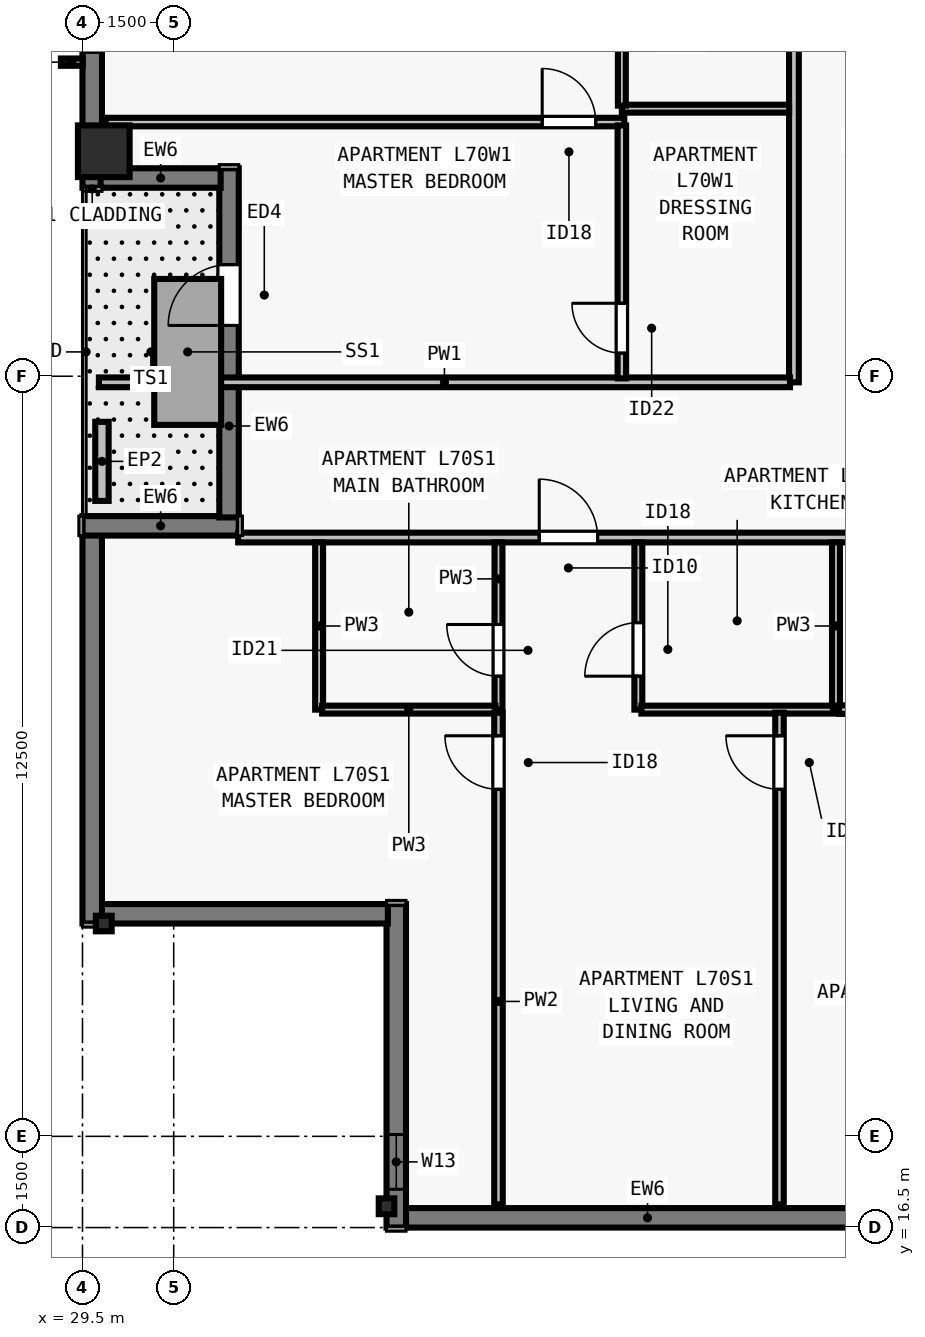
"""IFC4 building model, lengths in metres.
Left out: names, types, materials, properties, quantities, classifications, styles, units other than length and angle.
Written with IfcOpenShell. Run it as: python <this file> out.ifc"""

import sys

from ifc_helpers import new_model, si_unit, direction, frame, frame_2d, origin, origin_2d, place, context, subcontext, project, spatial, rectangle, i_section, extrude, element, fill, save


model = new_model("IFC4")
c1 = context("Model", 3, precision=1e-05, world=origin(), true_north=direction((0.0, 1.0)))
c2 = subcontext(c1, "Body", "Model", "MODEL_VIEW")
j1 = project(units=[si_unit("LENGTHUNIT", "METRE"), si_unit("PLANEANGLEUNIT", "RADIAN")], contexts=[c1])
p1 = place(None, origin())
s1 = spatial("IfcSite", under=j1, at=p1, CompositionType="ELEMENT")
p2 = place(p1, origin())
s2 = spatial("IfcBuilding", under=s1, at=p2, CompositionType="ELEMENT")
p3 = place(p2, frame((0.0, 0.0, 255.0)))
s3 = spatial("IfcBuildingStorey", under=s2, at=p3, CompositionType="ELEMENT", Elevation=255.0)
p4 = place(p3, frame((34.5, 16.85, 0.0), z_axis=(0.0, 0.0, 1.0), x_axis=(1.0, 0.0, 0.0)))
e1 = element("IfcColumn", 1, at=p4, inside=s3, PredefinedType="COLUMN", context=c2, shape_type="SweptSolid", body=[
    extrude(i_section(OverallWidth=0.256, OverallDepth=0.26, WebThickness=0.01, FlangeThickness=0.017, FilletRadius=0.013, at=origin_2d()), origin(), (0.0, 0.0, 1.0), 3.5),
])
p5 = place(p3, frame((29.85, 34.2, 0.0), z_axis=(0.0, 0.0, 1.0), x_axis=(0.0, 1.0, 0.0)))
e2 = element("IfcColumn", 2, at=p5, inside=s3, PredefinedType="COLUMN", context=c2, shape_type="SweptSolid", body=[
    extrude(rectangle(XDim=0.85, YDim=0.85, at=origin_2d()), origin(), (0.0, 0.0, 1.0), 3.5),
])
p6 = place(p3, frame((29.85, 21.5, 0.0), z_axis=(0.0, 0.0, 1.0), x_axis=(0.0, 1.0, 0.0)))
e3 = element("IfcColumn", 3, at=p6, inside=s3, PredefinedType="COLUMN", context=c2, shape_type="SweptSolid", body=[
    extrude(i_section(OverallWidth=0.256, OverallDepth=0.26, WebThickness=0.01, FlangeThickness=0.017, FilletRadius=0.013, at=origin_2d()), origin(), (0.0, 0.0, 1.0), 3.5),
])
p7 = place(p3, frame((29.66, 33.6, 0.0), z_axis=(0.0, 0.0, 1.0), x_axis=(0.0, 1.0, 0.0)))
e4 = element("IfcWall", 4, at=p7, inside=s3, PredefinedType="SOLIDWALL", context=c2, shape_type="SweptSolid", body=[
    extrude(rectangle(XDim=22.602, YDim=0.32, at=frame_2d((11.301, 0.0))), origin(), (0.0, 0.0, 1.0), 3.29),
])
p8 = place(p7, frame((2.225, 0.0, 0.8)))
e5 = element("IfcOpeningElement", 5, at=p8, cuts=e4, PredefinedType="OPENING", context=c2, shape_type="SweptSolid", body=[
    extrude(rectangle(XDim=1.55, YDim=1.678, at=frame_2d((0.775, 0.839))), frame((0.0, 0.17, 0.0), z_axis=(0.0, -1.0, 0.0), x_axis=(1.0, 0.0, 0.0)), (0.0, 0.0, 1.0), 0.34),
])
p9 = place(p7, frame((4.726, 0.0, 0.8)))
e6 = element("IfcOpeningElement", 6, at=p9, cuts=e4, PredefinedType="OPENING", context=c2, shape_type="SweptSolid", body=[
    extrude(rectangle(XDim=1.85, YDim=1.678, at=frame_2d((0.925, 0.839))), frame((0.0, 0.17, 0.0), z_axis=(0.0, -1.0, 0.0), x_axis=(1.0, 0.0, 0.0)), (0.0, 0.0, 1.0), 0.34),
])
p10 = place(p7, frame((11.726, 0.0, 0.8)))
e7 = element("IfcOpeningElement", 7, at=p10, cuts=e4, PredefinedType="OPENING", context=c2, shape_type="SweptSolid", body=[
    extrude(rectangle(XDim=1.85, YDim=1.678, at=frame_2d((0.925, 0.839))), frame((0.0, 0.17, 0.0), z_axis=(0.0, -1.0, 0.0), x_axis=(1.0, 0.0, 0.0)), (0.0, 0.0, 1.0), 0.34),
])
p11 = place(p3, frame((69.5, 16.66, 0.0), z_axis=(0.0, 0.0, 1.0), x_axis=(-1.0, 0.0, 0.0)))
e8 = element("IfcWall", 8, at=p11, inside=s3, PredefinedType="SOLIDWALL", context=c2, shape_type="SweptSolid", body=[
    extrude(rectangle(XDim=34.702, YDim=0.32, at=frame_2d((17.351, 0.0))), origin(), (0.0, 0.0, 1.0), 3.29),
])
p12 = place(p11, frame((4.312, 0.0, 0.8)))
e9 = element("IfcOpeningElement", 9, at=p12, cuts=e8, PredefinedType="OPENING", context=c2, shape_type="SweptSolid", body=[
    extrude(rectangle(XDim=1.55, YDim=1.678, at=frame_2d((0.775, 0.839))), frame((0.0, 0.17, 0.0), z_axis=(0.0, -1.0, 0.0), x_axis=(1.0, 0.0, 0.0)), (0.0, 0.0, 1.0), 0.34),
])
p13 = place(p11, frame((7.988, 0.0, 0.8)))
e10 = element("IfcOpeningElement", 10, at=p13, cuts=e8, PredefinedType="OPENING", context=c2, shape_type="SweptSolid", body=[
    extrude(rectangle(XDim=1.85, YDim=1.678, at=frame_2d((0.925, 0.839))), frame((0.0, 0.17, 0.0), z_axis=(0.0, -1.0, 0.0), x_axis=(1.0, 0.0, 0.0)), (0.0, 0.0, 1.0), 0.34),
])
p14 = place(p11, frame((15.188, 0.0, 0.8)))
e11 = element("IfcOpeningElement", 11, at=p14, cuts=e8, PredefinedType="OPENING", context=c2, shape_type="SweptSolid", body=[
    extrude(rectangle(XDim=1.85, YDim=1.678, at=frame_2d((0.925, 0.839))), frame((0.0, 0.17, 0.0), z_axis=(0.0, -1.0, 0.0), x_axis=(1.0, 0.0, 0.0)), (0.0, 0.0, 1.0), 0.34),
])
p15 = place(p11, frame((18.264, 0.0, 0.8)))
e12 = element("IfcOpeningElement", 12, at=p15, cuts=e8, PredefinedType="OPENING", context=c2, shape_type="SweptSolid", body=[
    extrude(rectangle(XDim=1.55, YDim=1.678, at=frame_2d((0.775, 0.839))), frame((0.0, 0.17, 0.0), z_axis=(0.0, -1.0, 0.0), x_axis=(1.0, 0.0, 0.0)), (0.0, 0.0, 1.0), 0.34),
])
p16 = place(p11, frame((25.014, 0.0, 0.8)))
e13 = element("IfcOpeningElement", 13, at=p16, cuts=e8, PredefinedType="OPENING", context=c2, shape_type="SweptSolid", body=[
    extrude(rectangle(XDim=1.55, YDim=1.678, at=frame_2d((0.775, 0.839))), frame((0.0, 0.17, 0.0), z_axis=(0.0, -1.0, 0.0), x_axis=(1.0, 0.0, 0.0)), (0.0, 0.0, 1.0), 0.34),
])
p17 = place(p11, frame((20.63, 0.0, 0.8)))
e14 = element("IfcOpeningElement", 14, at=p17, cuts=e8, PredefinedType="OPENING", context=c2, shape_type="SweptSolid", body=[
    extrude(rectangle(XDim=0.9, YDim=1.678, at=frame_2d((0.45, 0.839))), frame((0.0, 0.17, 0.0), z_axis=(0.0, -1.0, 0.0), x_axis=(1.0, 0.0, 0.0)), (0.0, 0.0, 1.0), 0.34),
])
p18 = place(p11, frame((10.87, 0.0, 0.8)))
e15 = element("IfcOpeningElement", 15, at=p18, cuts=e8, PredefinedType="OPENING", context=c2, shape_type="SweptSolid", body=[
    extrude(rectangle(XDim=0.9, YDim=1.678, at=frame_2d((0.45, 0.839))), frame((0.0, 0.17, 0.0), z_axis=(0.0, -1.0, 0.0), x_axis=(1.0, 0.0, 0.0)), (0.0, 0.0, 1.0), 0.34),
])
p19 = place(p3, frame((34.66, 16.5, 0.0), z_axis=(0.0, 0.0, 1.0), x_axis=(0.0, 1.0, 0.0)))
e16 = element("IfcWall", 16, at=p19, inside=s3, PredefinedType="SOLIDWALL", context=c2, shape_type="SweptSolid", body=[
    extrude(rectangle(XDim=5.32, YDim=0.32, at=frame_2d((2.66, 0.0))), origin(), (0.0, 0.0, 1.0), 3.29),
])
p20 = place(p19, frame((0.63, 0.0, 0.8)))
e17 = element("IfcOpeningElement", 17, at=p20, cuts=e16, PredefinedType="OPENING", context=c2, shape_type="SweptSolid", body=[
    extrude(rectangle(XDim=0.9, YDim=1.678, at=frame_2d((0.45, 0.839))), frame((0.0, 0.17, 0.0), z_axis=(0.0, -1.0, 0.0), x_axis=(1.0, 0.0, 0.0)), (0.0, 0.0, 1.0), 0.34),
])
p21 = place(p3, frame((34.522, 21.66, 0.0), z_axis=(0.0, 0.0, 1.0), x_axis=(-1.0, 0.0, 0.0)))
e18 = element("IfcWall", 18, at=p21, inside=s3, PredefinedType="SOLIDWALL", context=c2, shape_type="SweptSolid", body=[
    extrude(rectangle(XDim=4.724, YDim=0.32, at=frame_2d((2.362, 0.0))), origin(), (0.0, 0.0, 1.0), 3.29),
])
p22 = place(p3, frame((29.66, 21.5, 0.0), z_axis=(0.0, 0.0, 1.0), x_axis=(0.0, 1.0, 0.0)))
e19 = element("IfcWall", 19, at=p22, inside=s3, PredefinedType="SOLIDWALL", context=c2, shape_type="SweptSolid", body=[
    extrude(rectangle(XDim=6.402, YDim=0.32, at=frame_2d((3.201, 0.0))), origin(), (0.0, 0.0, 1.0), 3.29),
])
p23 = place(p3, frame((29.5, 28.04, 0.0), z_axis=(0.0, 0.0, 1.0), x_axis=(1.0, 0.0, 0.0)))
e20 = element("IfcWall", 20, at=p23, inside=s3, PredefinedType="SOLIDWALL", context=c2, shape_type="SweptSolid", body=[
    extrude(rectangle(XDim=2.57, YDim=0.32, at=frame_2d((1.285, 0.0))), origin(), (0.0, 0.0, 1.0), 3.29),
])
p24 = place(p3, frame((31.91, 28.178, 0.0), z_axis=(0.0, 0.0, 1.0), x_axis=(0.0, 1.0, 0.0)))
e21 = element("IfcWall", 21, at=p24, inside=s3, PredefinedType="SOLIDWALL", context=c2, shape_type="SweptSolid", body=[
    extrude(rectangle(XDim=5.742, YDim=0.32, at=frame_2d((2.871, 0.0))), origin(), (0.0, 0.0, 1.0), 3.29),
])
p25 = place(p24, frame((3.157, 0.0, 0.0)))
e22 = element("IfcOpeningElement", 22, at=p25, cuts=e21, PredefinedType="OPENING", context=c2, shape_type="SweptSolid", body=[
    extrude(rectangle(XDim=1.0, YDim=2.15, at=frame_2d((0.5, 1.075))), frame((0.0, 0.17, 0.0), z_axis=(0.0, -1.0, 0.0), x_axis=(1.0, 0.0, 0.0)), (0.0, 0.0, 1.0), 0.34),
])
p26 = place(p3, frame((31.772, 33.76, 0.0), z_axis=(0.0, 0.0, 1.0), x_axis=(-1.0, 0.0, 0.0)))
e23 = element("IfcWall", 23, at=p26, inside=s3, PredefinedType="SOLIDWALL", context=c2, shape_type="SweptSolid", body=[
    extrude(rectangle(XDim=1.974, YDim=0.32, at=frame_2d((0.987, 0.0))), origin(), (0.0, 0.0, 1.0), 3.29),
])
p27 = place(p3, frame((29.82, 28.45, 0.0), z_axis=(0.0, 0.0, 1.0), x_axis=(0.0, 1.0, 0.0)))
e24 = element("IfcWall", 24, at=p27, inside=s3, PredefinedType="PARAPET", context=c2, shape_type="SweptSolid", body=[
    extrude(rectangle(XDim=1.3, YDim=0.22, at=frame_2d((0.65, 0.0))), origin(), (0.0, 0.0, 1.0), 0.55),
])
p28 = place(p3, frame((32.06, 27.847, 0.0), z_axis=(0.0, 0.0, 1.0), x_axis=(1.0, 0.0, 0.0)))
e25 = element("IfcWall", 25, at=p28, inside=s3, PredefinedType="PARTITIONING", context=c2, shape_type="SweptSolid", body=[
    extrude(rectangle(XDim=42.135, YDim=0.16, at=frame_2d((21.067, 0.0))), origin(), (0.0, 0.0, 1.0), 2.958),
])
p29 = place(p28, frame((4.951, 0.0, 0.0)))
e26 = element("IfcOpeningElement", 26, at=p29, cuts=e25, PredefinedType="OPENING", context=c2, shape_type="SweptSolid", body=[
    extrude(rectangle(XDim=0.96, YDim=2.18, at=frame_2d((0.48, 1.09))), frame((0.0, 0.09, 0.0), z_axis=(0.0, -1.0, 0.0), x_axis=(1.0, 0.0, 0.0)), (0.0, 0.0, 1.0), 0.18),
])
p30 = place(p28, frame((19.525, 0.0, 0.0)))
e27 = element("IfcOpeningElement", 27, at=p30, cuts=e25, PredefinedType="OPENING", context=c2, shape_type="SweptSolid", body=[
    extrude(rectangle(XDim=0.96, YDim=2.18, at=frame_2d((0.48, 1.09))), frame((0.0, 0.09, 0.0), z_axis=(0.0, -1.0, 0.0), x_axis=(1.0, 0.0, 0.0)), (0.0, 0.0, 1.0), 0.18),
])
p31 = place(p28, frame((34.034, 0.0, 0.0)))
e28 = element("IfcOpeningElement", 28, at=p31, cuts=e25, PredefinedType="OPENING", context=c2, shape_type="SweptSolid", body=[
    extrude(rectangle(XDim=0.96, YDim=2.18, at=frame_2d((0.48, 1.09))), frame((0.0, 0.09, 0.0), z_axis=(0.0, -1.0, 0.0), x_axis=(1.0, 0.0, 0.0)), (0.0, 0.0, 1.0), 0.18),
])
p32 = place(p3, frame((41.2, 30.4, 0.0), z_axis=(0.0, 0.0, 1.0), x_axis=(0.0, 1.0, 0.0)))
e29 = element("IfcWall", 29, at=p32, inside=s3, PredefinedType="PARTITIONING", context=c2, shape_type="SweptSolid", body=[
    extrude(rectangle(XDim=17.2, YDim=0.16, at=frame_2d((8.6, 0.0))), origin(), (0.0, 0.0, 1.0), 3.29),
])
p33 = place(p32, frame((8.12, 0.0, 0.0)))
e30 = element("IfcOpeningElement", 30, at=p33, cuts=e29, PredefinedType="OPENING", context=c2, shape_type="SweptSolid", body=[
    extrude(rectangle(XDim=0.96, YDim=2.18, at=frame_2d((0.48, 1.09))), frame((0.0, 0.09, 0.0), z_axis=(0.0, -1.0, 0.0), x_axis=(1.0, 0.0, 0.0)), (0.0, 0.0, 1.0), 0.18),
])
p34 = place(p3, frame((29.77, 30.4, 0.0), z_axis=(0.0, 0.0, 1.0), x_axis=(1.0, 0.0, 0.0)))
e31 = element("IfcWall", 31, at=p34, inside=s3, PredefinedType="PARTITIONING", context=c2, shape_type="SweptSolid", body=[
    extrude(rectangle(XDim=11.365, YDim=0.16, at=frame_2d((5.683, 0.0))), origin(), (0.0, 0.0, 1.0), 3.29),
])
p35 = place(p3, frame((33.391, 25.018, 0.0), z_axis=(0.0, 0.0, 1.0), x_axis=(0.0, 1.0, 0.0)))
e32 = element("IfcWall", 32, at=p35, inside=s3, PredefinedType="PLUMBINGWALL", context=c2, shape_type="SweptSolid", body=[
    extrude(rectangle(XDim=2.75, YDim=0.13, at=frame_2d((1.375, 0.0))), origin(), (0.0, 0.0, 1.0), 3.29),
])
p36 = place(p3, frame((36.341, 25.018, 0.0), z_axis=(0.0, 0.0, 1.0), x_axis=(0.0, 1.0, 0.0)))
e33 = element("IfcWall", 33, at=p36, inside=s3, PredefinedType="PLUMBINGWALL", context=c2, shape_type="SweptSolid", body=[
    extrude(rectangle(XDim=2.75, YDim=0.13, at=frame_2d((1.375, 0.0))), origin(), (0.0, 0.0, 1.0), 3.29),
])
p37 = place(p36, frame((0.55, 0.0, 0.0)))
e34 = element("IfcOpeningElement", 34, at=p37, cuts=e33, PredefinedType="OPENING", context=c2, shape_type="SweptSolid", body=[
    extrude(rectangle(XDim=0.85, YDim=2.08, at=frame_2d((0.425, 1.04))), frame((0.0, 0.075, 0.0), z_axis=(0.0, -1.0, 0.0), x_axis=(1.0, 0.0, 0.0)), (0.0, 0.0, 1.0), 0.15),
])
p38 = place(p3, frame((33.441, 25.018, 0.0), z_axis=(0.0, 0.0, 1.0), x_axis=(1.0, 0.0, 0.0)))
e35 = element("IfcWall", 35, at=p38, inside=s3, PredefinedType="PLUMBINGWALL", context=c2, shape_type="SweptSolid", body=[
    extrude(rectangle(XDim=2.85, YDim=0.13, at=frame_2d((1.425, 0.0))), origin(), (0.0, 0.0, 1.0), 2.958),
])
p39 = place(p3, frame((41.891, 25.018, 0.0), z_axis=(0.0, 0.0, 1.0), x_axis=(0.0, 1.0, 0.0)))
e36 = element("IfcWall", 36, at=p39, inside=s3, PredefinedType="PLUMBINGWALL", context=c2, shape_type="SweptSolid", body=[
    extrude(rectangle(XDim=2.75, YDim=0.13, at=frame_2d((1.375, 0.0))), origin(), (0.0, 0.0, 1.0), 3.29),
])
p40 = place(p3, frame((38.641, 25.018, 0.0), z_axis=(0.0, 0.0, 1.0), x_axis=(0.0, 1.0, 0.0)))
e37 = element("IfcWall", 37, at=p40, inside=s3, PredefinedType="PLUMBINGWALL", context=c2, shape_type="SweptSolid", body=[
    extrude(rectangle(XDim=2.75, YDim=0.13, at=frame_2d((1.375, 0.0))), origin(), (0.0, 0.0, 1.0), 3.29),
])
p41 = place(p40, frame((0.55, 0.0, 0.0)))
e38 = element("IfcOpeningElement", 38, at=p41, cuts=e37, PredefinedType="OPENING", context=c2, shape_type="SweptSolid", body=[
    extrude(rectangle(XDim=0.88, YDim=2.1, at=frame_2d((0.44, 1.05))), frame((0.0, 0.075, 0.0), z_axis=(0.0, -1.0, 0.0), x_axis=(1.0, 0.0, 0.0)), (0.0, 0.0, 1.0), 0.15),
])
p42 = place(p3, frame((38.691, 25.018, 0.0), z_axis=(0.0, 0.0, 1.0), x_axis=(1.0, 0.0, 0.0)))
e39 = element("IfcWall", 39, at=p42, inside=s3, PredefinedType="PLUMBINGWALL", context=c2, shape_type="SweptSolid", body=[
    extrude(rectangle(XDim=3.15, YDim=0.13, at=frame_2d((1.575, 0.0))), origin(), (0.0, 0.0, 1.0), 3.29),
])
p43 = place(p3, frame((36.341, 16.88, 0.0), z_axis=(0.0, 0.0, 1.0), x_axis=(0.0, 1.0, 0.0)))
e40 = element("IfcWall", 40, at=p43, inside=s3, PredefinedType="PARTITIONING", context=c2, shape_type="SweptSolid", body=[
    extrude(rectangle(XDim=8.088, YDim=0.14, at=frame_2d((4.044, 0.0))), origin(), (0.0, 0.0, 1.0), 2.573),
])
p44 = place(p43, frame((6.827, 0.0, 0.0)))
e41 = element("IfcOpeningElement", 41, at=p44, cuts=e40, PredefinedType="OPENING", context=c2, shape_type="SweptSolid", body=[
    extrude(rectangle(XDim=0.88, YDim=2.1, at=frame_2d((0.44, 1.05))), frame((0.0, 0.08, 0.0), z_axis=(0.0, -1.0, 0.0), x_axis=(1.0, 0.0, 0.0)), (0.0, 0.0, 1.0), 0.16),
])
p45 = place(p3, frame((40.962, 16.88, 0.0), z_axis=(0.0, 0.0, 1.0), x_axis=(0.0, 1.0, 0.0)))
e42 = element("IfcWall", 42, at=p45, inside=s3, PredefinedType="PARTITIONING", context=c2, shape_type="SweptSolid", body=[
    extrude(rectangle(XDim=8.088, YDim=0.14, at=frame_2d((4.044, 0.0))), origin(), (0.0, 0.0, 1.0), 3.29),
])
p46 = place(p45, frame((6.827, 0.0, 0.0)))
e43 = element("IfcOpeningElement", 43, at=p46, cuts=e42, PredefinedType="OPENING", context=c2, shape_type="SweptSolid", body=[
    extrude(rectangle(XDim=0.88, YDim=2.1, at=frame_2d((0.44, 1.05))), frame((0.0, 0.08, 0.0), z_axis=(0.0, -1.0, 0.0), x_axis=(1.0, 0.0, 0.0)), (0.0, 0.0, 1.0), 0.16),
])
p47 = place(p3, frame((41.941, 25.018, 0.0), z_axis=(0.0, 0.0, 1.0), x_axis=(1.0, 0.0, 0.0)))
e44 = element("IfcWall", 44, at=p47, inside=s3, PredefinedType="PARTITIONING", context=c2, shape_type="SweptSolid", body=[
    extrude(rectangle(XDim=3.171, YDim=0.14, at=frame_2d((1.586, 0.0))), origin(), (0.0, 0.0, 1.0), 3.29),
])
p48 = place(p47, frame((0.4, 0.0, 0.0)))
e45 = element("IfcOpeningElement", 45, at=p48, cuts=e44, PredefinedType="OPENING", context=c2, shape_type="SweptSolid", body=[
    extrude(rectangle(XDim=0.82, YDim=2.1, at=frame_2d((0.41, 1.05))), frame((0.0, 0.08, 0.0), z_axis=(0.0, -1.0, 0.0), x_axis=(1.0, 0.0, 0.0)), (0.0, 0.0, 1.0), 0.16),
])
p49 = place(p3, frame((38.37, 34.9, 0.0), z_axis=(0.0, 0.0, 1.0), x_axis=(1.0, 0.0, 0.0)))
e46 = element("IfcWall", 46, at=p49, inside=s3, PredefinedType="PLUMBINGWALL", context=c2, shape_type="SweptSolid", body=[
    extrude(rectangle(XDim=2.75, YDim=0.13, at=frame_2d((1.375, 0.0))), origin(), (0.0, 0.0, 1.0), 3.29),
])
p50 = place(p3, frame((38.37, 34.95, 0.0), z_axis=(0.0, 0.0, 1.0), x_axis=(0.0, 1.0, 0.0)))
e47 = element("IfcWall", 47, at=p50, inside=s3, PredefinedType="PLUMBINGWALL", context=c2, shape_type="SweptSolid", body=[
    extrude(rectangle(XDim=2.85, YDim=0.13, at=frame_2d((1.425, 0.0))), origin(), (0.0, 0.0, 1.0), 3.29),
])
p51 = place(p3, frame((29.88, 34.68, 0.0), z_axis=(0.0, 0.0, 1.0), x_axis=(1.0, 0.0, 0.0)))
e48 = element("IfcWall", 48, at=p51, inside=s3, PredefinedType="PARTITIONING", context=c2, shape_type="SweptSolid", body=[
    extrude(rectangle(XDim=8.53, YDim=0.14, at=frame_2d((4.265, 0.0))), origin(), (0.0, 0.0, 1.0), 2.958),
])
p52 = place(p51, frame((7.18, 0.0, 0.0)))
e49 = element("IfcOpeningElement", 49, at=p52, cuts=e48, PredefinedType="OPENING", context=c2, shape_type="SweptSolid", body=[
    extrude(rectangle(XDim=0.88, YDim=2.1, at=frame_2d((0.44, 1.05))), frame((0.0, 0.08, 0.0), z_axis=(0.0, -1.0, 0.0), x_axis=(1.0, 0.0, 0.0)), (0.0, 0.0, 1.0), 0.16),
])
p53 = place(p3, frame((38.37, 30.465, 0.0), z_axis=(0.0, 0.0, 1.0), x_axis=(0.0, 1.0, 0.0)))
e50 = element("IfcWall", 50, at=p53, inside=s3, PredefinedType="PARTITIONING", context=c2, shape_type="SweptSolid", body=[
    extrude(rectangle(XDim=4.16, YDim=0.14, at=frame_2d((2.08, 0.0))), origin(), (0.0, 0.0, 1.0), 3.29),
])
p54 = place(p53, frame((0.415, 0.0, 0.0)))
e51 = element("IfcOpeningElement", 51, at=p54, cuts=e50, PredefinedType="OPENING", context=c2, shape_type="SweptSolid", body=[
    extrude(rectangle(XDim=0.82, YDim=2.1, at=frame_2d((0.41, 1.05))), frame((0.0, 0.08, 0.0), z_axis=(0.0, -1.0, 0.0), x_axis=(1.0, 0.0, 0.0)), (0.0, 0.0, 1.0), 0.16),
])
p55 = place(p25, origin())
e52 = element("IfcDoor", 52, at=p55, inside=s3, OperationType="SINGLE_SWING_LEFT", PredefinedType="DOOR", context=c2, shape_type="SweptSolid", body=[
    extrude(rectangle(XDim=1.0, YDim=2.15, at=frame_2d((0.5, 1.075))), frame((0.0, 0.025, 0.0), z_axis=(0.0, -1.0, 0.0), x_axis=(1.0, 0.0, 0.0)), (0.0, 0.0, 1.0), 0.05),
])
fill(e22, e52)
p56 = place(p20, origin())
e53 = element("IfcWindow", 53, at=p56, inside=s3, PartitioningType="SINGLE_PANEL", PredefinedType="WINDOW", context=c2, shape_type="SweptSolid", body=[
    extrude(rectangle(XDim=0.9, YDim=1.678, at=frame_2d((0.45, 0.839))), frame((0.0, -0.04, 0.0), z_axis=(0.0, -1.0, 0.0), x_axis=(1.0, 0.0, 0.0)), (0.0, 0.0, 1.0), 0.06),
])
fill(e17, e53)
p57 = place(p37, origin())
e54 = element("IfcDoor", 54, at=p57, inside=s3, OperationType="SINGLE_SWING_RIGHT", PredefinedType="DOOR", context=c2, shape_type="SweptSolid", body=[
    extrude(rectangle(XDim=0.85, YDim=2.08, at=frame_2d((0.425, 1.04))), frame((0.0, 0.025, 0.0), z_axis=(0.0, -1.0, 0.0), x_axis=(1.0, 0.0, 0.0)), (0.0, 0.0, 1.0), 0.05),
])
fill(e34, e54)
p58 = place(p41, origin())
e55 = element("IfcDoor", 55, at=p58, inside=s3, OperationType="SINGLE_SWING_LEFT", PredefinedType="DOOR", context=c2, shape_type="SweptSolid", body=[
    extrude(rectangle(XDim=0.88, YDim=2.1, at=frame_2d((0.44, 1.05))), frame((0.0, 0.025, 0.0), z_axis=(0.0, -1.0, 0.0), x_axis=(1.0, 0.0, 0.0)), (0.0, 0.0, 1.0), 0.05),
])
fill(e38, e55)
p59 = place(p44, origin())
e56 = element("IfcDoor", 56, at=p59, inside=s3, OperationType="SINGLE_SWING_RIGHT", PredefinedType="DOOR", context=c2, shape_type="SweptSolid", body=[
    extrude(rectangle(XDim=0.88, YDim=2.1, at=frame_2d((0.44, 1.05))), frame((0.0, 0.025, 0.0), z_axis=(0.0, -1.0, 0.0), x_axis=(1.0, 0.0, 0.0)), (0.0, 0.0, 1.0), 0.05),
])
fill(e41, e56)
p60 = place(p46, origin())
e57 = element("IfcDoor", 57, at=p60, inside=s3, OperationType="SINGLE_SWING_RIGHT", PredefinedType="DOOR", context=c2, shape_type="SweptSolid", body=[
    extrude(rectangle(XDim=0.88, YDim=2.1, at=frame_2d((0.44, 1.05))), frame((0.0, 0.025, 0.0), z_axis=(0.0, -1.0, 0.0), x_axis=(1.0, 0.0, 0.0)), (0.0, 0.0, 1.0), 0.05),
])
fill(e43, e57)
p61 = place(p29, origin())
e58 = element("IfcDoor", 58, at=p61, inside=s3, OperationType="SINGLE_SWING_LEFT", PredefinedType="DOOR", context=c2, shape_type="SweptSolid", body=[
    extrude(rectangle(XDim=0.96, YDim=2.18, at=frame_2d((0.48, 1.09))), frame((0.0, 0.025, 0.0), z_axis=(0.0, -1.0, 0.0), x_axis=(1.0, 0.0, 0.0)), (0.0, 0.0, 1.0), 0.05),
])
fill(e26, e58)
p62 = place(p54, origin())
e59 = element("IfcDoor", 59, at=p62, inside=s3, OperationType="SINGLE_SWING_RIGHT", PredefinedType="DOOR", context=c2, shape_type="SweptSolid", body=[
    extrude(rectangle(XDim=0.82, YDim=2.1, at=frame_2d((0.41, 1.05))), frame((0.0, 0.025, 0.0), z_axis=(0.0, -1.0, 0.0), x_axis=(1.0, 0.0, 0.0)), (0.0, 0.0, 1.0), 0.05),
])
fill(e51, e59)
p63 = place(p52, origin())
e60 = element("IfcDoor", 60, at=p63, inside=s3, OperationType="SINGLE_SWING_LEFT", PredefinedType="DOOR", context=c2, shape_type="SweptSolid", body=[
    extrude(rectangle(XDim=0.88, YDim=2.1, at=frame_2d((0.44, 1.05))), frame((0.0, 0.025, 0.0), z_axis=(0.0, -1.0, 0.0), x_axis=(1.0, 0.0, 0.0)), (0.0, 0.0, 1.0), 0.05),
])
fill(e49, e60)
save(model, sys.argv[1])
